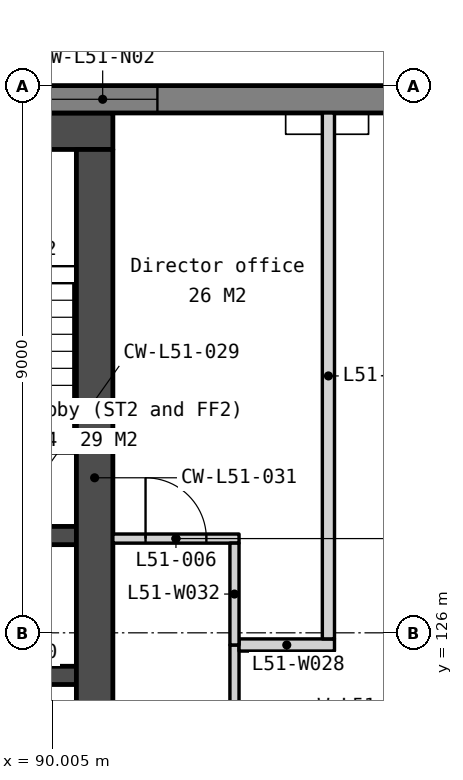
"""IFC4 building model, lengths in metres.
Left out: names, types, materials, properties, quantities, classifications, styles, units other than length and angle.
Written with IfcOpenShell. Run it as: python <this file> out.ifc"""

import sys

from ifc_helpers import new_model, si_unit, direction, frame, frame_2d, origin, place, context, subcontext, project, spatial, polyline, rectangle, outline, extrude, element, fill, save


model = new_model("IFC4")
c1 = context("Model", 3, precision=1e-05, world=origin(), true_north=direction((0.0, 1.0)))
c2 = subcontext(c1, "Body", "Model", "MODEL_VIEW")
j1 = project(units=[si_unit("LENGTHUNIT", "METRE"), si_unit("PLANEANGLEUNIT", "RADIAN")], contexts=[c1])
p1 = place(None, origin())
s1 = spatial("IfcSite", under=j1, at=p1, CompositionType="ELEMENT")
p2 = place(p1, origin())
s2 = spatial("IfcBuilding", under=s1, at=p2, CompositionType="ELEMENT")
p3 = place(p2, frame((0.0, 0.0, 203.6)))
s3 = spatial("IfcBuildingStorey", under=s2, at=p3, CompositionType="ELEMENT", Elevation=203.6)
p4 = place(p3, frame((69.0, 134.25, 0.0), z_axis=(0.0, 0.0, 1.0), x_axis=(1.0, 0.0, 0.0)))
e1 = element("IfcWall", 1, at=p4, inside=s3, PredefinedType="SOLIDWALL", context=c2, shape_type="SweptSolid", body=[
    extrude(rectangle(XDim=22.0, YDim=0.6, at=frame_2d((11.0, 0.0))), origin(), (0.0, 0.0, 1.0), 3.75),
])
for number, where, z_axis, x_axis in (
    (2, (87.85, 127.6, 0.0), (0.0, 0.0, 1.0), (1.0, 0.0, 0.0)),
    (3, (87.85, 125.3, 0.0), (0.0, 0.0, 1.0), (1.0, 0.0, 0.0)),
):
    element("IfcWall", number, at=place(p3, frame(where, z_axis=z_axis, x_axis=x_axis)), inside=s3, PredefinedType="SOLIDWALL", context=c2, shape_type="SweptSolid", body=[
        extrude(rectangle(XDim=2.55, YDim=0.3, at=frame_2d((1.275, 0.0))), origin(), (0.0, 0.0, 1.0), 3.75),
    ])
p5 = place(p3, frame((90.7, 133.95, 0.0), z_axis=(0.0, 0.0, 1.0), x_axis=(0.0, -1.0, 0.0)))
e4 = element("IfcWall", 4, at=p5, inside=s3, PredefinedType="SOLIDWALL", context=c2, shape_type="SweptSolid", body=[
    extrude(rectangle(XDim=10.8, YDim=0.6, at=frame_2d((5.4, 0.0))), origin(), (0.0, 0.0, 1.0), 3.75),
])
p6 = place(p3, frame((99.365, 134.775, -0.15), z_axis=(0.0, 0.0, 1.0), x_axis=(-1.0, 0.0, 0.0)))
e5 = element("IfcWall", 5, at=p6, inside=s3, PredefinedType="SOLIDWALL", context=c2, shape_type="SweptSolid", body=[
    extrude(outline(polyline([(38.729, 0.0), (38.729, 3.9), (0.0, 3.9), (0.0, 0.0), (38.729, 0.0)])), frame((0.0, 0.225, 0.0), z_axis=(0.0, -1.0, 0.0), x_axis=(1.0, 0.0, 0.0)), (0.0, 0.0, 1.0), 0.45),
])
p7 = place(p6, frame((0.807, 0.0, 0.95)))
e6 = element("IfcOpeningElement", 6, at=p7, cuts=e5, PredefinedType="OPENING", context=c2, shape_type="SweptSolid", body=[
    extrude(rectangle(XDim=1.2, YDim=2.2, at=frame_2d((0.6, 1.1))), frame((0.0, 0.235, 0.0), z_axis=(0.0, -1.0, 0.0), x_axis=(1.0, 0.0, 0.0)), (0.0, 0.0, 1.0), 0.47),
])
p8 = place(p6, frame((7.632, 0.0, 0.95)))
e7 = element("IfcOpeningElement", 7, at=p8, cuts=e5, PredefinedType="OPENING", context=c2, shape_type="SweptSolid", body=[
    extrude(rectangle(XDim=1.8, YDim=2.2, at=frame_2d((0.9, 1.1))), frame((0.0, 0.235, 0.0), z_axis=(0.0, -1.0, 0.0), x_axis=(1.0, 0.0, 0.0)), (0.0, 0.0, 1.0), 0.47),
])
p9 = place(p6, frame((9.932, 0.0, 0.95)))
e8 = element("IfcOpeningElement", 8, at=p9, cuts=e5, PredefinedType="OPENING", context=c2, shape_type="SweptSolid", body=[
    extrude(rectangle(XDim=1.8, YDim=2.2, at=frame_2d((0.9, 1.1))), frame((0.0, 0.235, 0.0), z_axis=(0.0, -1.0, 0.0), x_axis=(1.0, 0.0, 0.0)), (0.0, 0.0, 1.0), 0.47),
])
p10 = place(p6, frame((17.315, 0.0, 0.95)))
e9 = element("IfcOpeningElement", 9, at=p10, cuts=e5, PredefinedType="OPENING", context=c2, shape_type="SweptSolid", body=[
    extrude(rectangle(XDim=1.8, YDim=2.2, at=frame_2d((0.9, 1.1))), frame((0.0, 0.235, 0.0), z_axis=(0.0, -1.0, 0.0), x_axis=(1.0, 0.0, 0.0)), (0.0, 0.0, 1.0), 0.47),
])
p11 = place(p6, frame((19.615, 0.0, 0.95)))
e10 = element("IfcOpeningElement", 10, at=p11, cuts=e5, PredefinedType="OPENING", context=c2, shape_type="SweptSolid", body=[
    extrude(rectangle(XDim=1.8, YDim=2.2, at=frame_2d((0.9, 1.1))), frame((0.0, 0.235, 0.0), z_axis=(0.0, -1.0, 0.0), x_axis=(1.0, 0.0, 0.0)), (0.0, 0.0, 1.0), 0.47),
])
p12 = place(p6, frame((26.997, 0.0, 0.95)))
e11 = element("IfcOpeningElement", 11, at=p12, cuts=e5, PredefinedType="OPENING", context=c2, shape_type="SweptSolid", body=[
    extrude(rectangle(XDim=1.8, YDim=2.2, at=frame_2d((0.9, 1.1))), frame((0.0, 0.235, 0.0), z_axis=(0.0, -1.0, 0.0), x_axis=(1.0, 0.0, 0.0)), (0.0, 0.0, 1.0), 0.47),
])
p13 = place(p6, frame((29.297, 0.0, 0.95)))
e12 = element("IfcOpeningElement", 12, at=p13, cuts=e5, PredefinedType="OPENING", context=c2, shape_type="SweptSolid", body=[
    extrude(rectangle(XDim=1.8, YDim=2.2, at=frame_2d((0.9, 1.1))), frame((0.0, 0.235, 0.0), z_axis=(0.0, -1.0, 0.0), x_axis=(1.0, 0.0, 0.0)), (0.0, 0.0, 1.0), 0.47),
])
p14 = place(p6, frame((36.722, 0.0, 0.95)))
e13 = element("IfcOpeningElement", 13, at=p14, cuts=e5, PredefinedType="OPENING", context=c2, shape_type="SweptSolid", body=[
    extrude(rectangle(XDim=1.2, YDim=2.2, at=frame_2d((0.6, 1.1))), frame((0.0, 0.235, 0.0), z_axis=(0.0, -1.0, 0.0), x_axis=(1.0, 0.0, 0.0)), (0.0, 0.0, 1.0), 0.47),
])
p15 = place(p3, frame((81.505, 98.627, -0.15), z_axis=(0.0, 0.0, 1.0), x_axis=(0.500002199942, 0.866024133644, 0.0)))
e14 = element("IfcWall", 14, at=p15, inside=s3, PredefinedType="SOLIDWALL", context=c2, shape_type="SweptSolid", body=[
    extrude(outline(polyline([(38.729, 0.0), (38.729, 3.9), (0.0, 3.9), (0.0, 0.0), (38.729, 0.0)])), frame((0.0, 0.225, 0.0), z_axis=(0.0, -1.0, 0.0), x_axis=(1.0, 0.0, 0.0)), (0.0, 0.0, 1.0), 0.45),
])
p16 = place(p15, frame((0.807, 0.0, 0.95)))
e15 = element("IfcOpeningElement", 15, at=p16, cuts=e14, PredefinedType="OPENING", context=c2, shape_type="SweptSolid", body=[
    extrude(rectangle(XDim=1.2, YDim=2.2, at=frame_2d((0.6, 1.1))), frame((0.0, 0.235, 0.0), z_axis=(0.0, -1.0, 0.0), x_axis=(1.0, 0.0, 0.0)), (0.0, 0.0, 1.0), 0.47),
])
p17 = place(p15, frame((7.632, 0.0, 0.95)))
e16 = element("IfcOpeningElement", 16, at=p17, cuts=e14, PredefinedType="OPENING", context=c2, shape_type="SweptSolid", body=[
    extrude(rectangle(XDim=1.8, YDim=2.2, at=frame_2d((0.9, 1.1))), frame((0.0, 0.235, 0.0), z_axis=(0.0, -1.0, 0.0), x_axis=(1.0, 0.0, 0.0)), (0.0, 0.0, 1.0), 0.47),
])
p18 = place(p15, frame((9.932, 0.0, 0.95)))
e17 = element("IfcOpeningElement", 17, at=p18, cuts=e14, PredefinedType="OPENING", context=c2, shape_type="SweptSolid", body=[
    extrude(rectangle(XDim=1.8, YDim=2.2, at=frame_2d((0.9, 1.1))), frame((0.0, 0.235, 0.0), z_axis=(0.0, -1.0, 0.0), x_axis=(1.0, 0.0, 0.0)), (0.0, 0.0, 1.0), 0.47),
])
p19 = place(p15, frame((17.315, 0.0, 0.95)))
e18 = element("IfcOpeningElement", 18, at=p19, cuts=e14, PredefinedType="OPENING", context=c2, shape_type="SweptSolid", body=[
    extrude(rectangle(XDim=1.8, YDim=2.2, at=frame_2d((0.9, 1.1))), frame((0.0, 0.235, 0.0), z_axis=(0.0, -1.0, 0.0), x_axis=(1.0, 0.0, 0.0)), (0.0, 0.0, 1.0), 0.47),
])
p20 = place(p15, frame((19.615, 0.0, 0.95)))
e19 = element("IfcOpeningElement", 19, at=p20, cuts=e14, PredefinedType="OPENING", context=c2, shape_type="SweptSolid", body=[
    extrude(rectangle(XDim=1.8, YDim=2.2, at=frame_2d((0.9, 1.1))), frame((0.0, 0.235, 0.0), z_axis=(0.0, -1.0, 0.0), x_axis=(1.0, 0.0, 0.0)), (0.0, 0.0, 1.0), 0.47),
])
p21 = place(p15, frame((26.997, 0.0, 0.95)))
e20 = element("IfcOpeningElement", 20, at=p21, cuts=e14, PredefinedType="OPENING", context=c2, shape_type="SweptSolid", body=[
    extrude(rectangle(XDim=1.8, YDim=2.2, at=frame_2d((0.9, 1.1))), frame((0.0, 0.235, 0.0), z_axis=(0.0, -1.0, 0.0), x_axis=(1.0, 0.0, 0.0)), (0.0, 0.0, 1.0), 0.47),
])
p22 = place(p15, frame((29.297, 0.0, 0.95)))
e21 = element("IfcOpeningElement", 21, at=p22, cuts=e14, PredefinedType="OPENING", context=c2, shape_type="SweptSolid", body=[
    extrude(rectangle(XDim=1.8, YDim=2.2, at=frame_2d((0.9, 1.1))), frame((0.0, 0.235, 0.0), z_axis=(0.0, -1.0, 0.0), x_axis=(1.0, 0.0, 0.0)), (0.0, 0.0, 1.0), 0.47),
])
p23 = place(p15, frame((36.722, 0.0, 0.95)))
e22 = element("IfcOpeningElement", 22, at=p23, cuts=e14, PredefinedType="OPENING", context=c2, shape_type="SweptSolid", body=[
    extrude(rectangle(XDim=1.2, YDim=2.2, at=frame_2d((0.6, 1.1))), frame((0.0, 0.235, 0.0), z_axis=(0.0, -1.0, 0.0), x_axis=(1.0, 0.0, 0.0)), (0.0, 0.0, 1.0), 0.47),
])
p24 = place(p3, frame((93.0, 120.025, 0.0), z_axis=(0.0, 0.0, 1.0), x_axis=(0.0, 1.0, 0.0)))
e23 = element("IfcWall", 23, at=p24, inside=s3, PredefinedType="PARTITIONING", context=c2, shape_type="SweptSolid", body=[
    extrude(rectangle(XDim=5.775, YDim=0.15, at=frame_2d((2.888, 0.0))), origin(), (0.0, 0.0, 1.0), 3.75),
])
p25 = place(p24, frame((1.988, 0.0, 0.0)))
e24 = element("IfcOpeningElement", 24, at=p25, cuts=e23, PredefinedType="OPENING", context=c2, shape_type="SweptSolid", body=[
    extrude(rectangle(XDim=1.8, YDim=2.1, at=frame_2d((0.9, 1.05))), frame((0.0, 0.085, 0.0), z_axis=(0.0, -1.0, 0.0), x_axis=(1.0, 0.0, 0.0)), (0.0, 0.0, 1.0), 0.17),
])
p26 = place(p3, frame((93.075, 125.8, 0.0), z_axis=(0.0, 0.0, 1.0), x_axis=(1.0, 0.0, 0.0)))
e25 = element("IfcWall", 25, at=p26, inside=s3, PredefinedType="PARTITIONING", context=c2, shape_type="SweptSolid", body=[
    extrude(rectangle(XDim=1.57, YDim=0.2, at=frame_2d((0.785, 0.0))), origin(), (0.0, 0.0, 1.0), 3.75),
])
p27 = place(p3, frame((94.545, 125.9, 0.0), z_axis=(0.0, 0.0, 1.0), x_axis=(0.0, 1.0, 0.0)))
e26 = element("IfcWall", 26, at=p27, inside=s3, PredefinedType="PARTITIONING", context=c2, shape_type="SweptSolid", body=[
    extrude(rectangle(XDim=8.65, YDim=0.2, at=frame_2d((4.325, 0.0))), origin(), (0.0, 0.0, 1.0), 3.75),
])
p28 = place(p3, frame((91.0, 127.55, 0.0), z_axis=(0.0, 0.0, 1.0), x_axis=(1.0, 0.0, 0.0)))
e27 = element("IfcWall", 27, at=p28, inside=s3, PredefinedType="PARTITIONING", context=c2, shape_type="SweptSolid", body=[
    extrude(rectangle(XDim=2.075, YDim=0.15, at=frame_2d((1.038, 0.0))), origin(), (0.0, 0.0, 1.0), 3.75),
])
p29 = place(p28, frame((0.538, 0.0, 0.0)))
e28 = element("IfcOpeningElement", 28, at=p29, cuts=e27, PredefinedType="OPENING", context=c2, shape_type="SweptSolid", body=[
    extrude(rectangle(XDim=1.0, YDim=2.1, at=frame_2d((0.5, 1.05))), frame((0.0, 0.085, 0.0), z_axis=(0.0, -1.0, 0.0), x_axis=(1.0, 0.0, 0.0)), (0.0, 0.0, 1.0), 0.17),
])
p30 = place(p3, frame((93.0, 125.8, 0.0), z_axis=(0.0, 0.0, 1.0), x_axis=(0.0, 1.0, 0.0)))
e29 = element("IfcWall", 29, at=p30, inside=s3, PredefinedType="PARTITIONING", context=c2, shape_type="SweptSolid", body=[
    extrude(rectangle(XDim=1.675, YDim=0.15, at=frame_2d((0.837, 0.0))), origin(), (0.0, 0.0, 1.0), 3.75),
])
p31 = place(p8, origin())
e30 = element("IfcWindow", 30, at=p31, inside=s3, PartitioningType="SINGLE_PANEL", PredefinedType="WINDOW", context=c2, shape_type="SweptSolid", body=[
    extrude(rectangle(XDim=1.8, YDim=2.2, at=frame_2d((0.9, 1.1))), frame((0.0, 0.03, 0.0), z_axis=(0.0, -1.0, 0.0), x_axis=(1.0, 0.0, 0.0)), (0.0, 0.0, 1.0), 0.06),
])
fill(e7, e30)
p32 = place(p29, origin())
e31 = element("IfcDoor", 31, at=p32, inside=s3, OperationType="SINGLE_SWING_LEFT", PredefinedType="DOOR", context=c2, shape_type="SweptSolid", body=[
    extrude(rectangle(XDim=1.0, YDim=2.1, at=frame_2d((0.5, 1.05))), frame((0.0, 0.025, 0.0), z_axis=(0.0, -1.0, 0.0), x_axis=(1.0, 0.0, 0.0)), (0.0, 0.0, 1.0), 0.05),
])
fill(e28, e31)
save(model, sys.argv[1])
